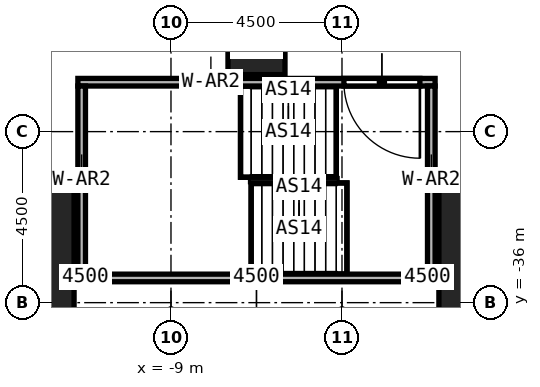
"""IFC4 building model, lengths in metres.
Left out: names, types, materials, properties, quantities, classifications, styles, units other than length and angle.
Written with IfcOpenShell. Run it as: python <this file> out.ifc"""

import sys

from ifc_helpers import new_model, si_unit, direction, frame, frame_2d, origin, origin_2d, place, context, subcontext, project, spatial, rectangle, extrude, element, fill, save


model = new_model("IFC4")
c1 = context("Model", 3, precision=1e-05, world=origin(), true_north=direction((0.0, 1.0)))
c2 = subcontext(c1, "Body", "Model", "MODEL_VIEW")
j1 = project(units=[si_unit("LENGTHUNIT", "METRE"), si_unit("PLANEANGLEUNIT", "RADIAN")], contexts=[c1])
p1 = place(None, origin())
s1 = spatial("IfcSite", under=j1, at=p1, CompositionType="ELEMENT")
p2 = place(p1, origin())
s2 = spatial("IfcBuilding", under=s1, at=p2, CompositionType="ELEMENT")
p3 = place(p2, frame((0.0, 0.0, 19.0)))
s3 = spatial("IfcBuildingStorey", under=s2, at=p3, CompositionType="ELEMENT", Elevation=19.0)
for number, where, z_axis, x_axis in (
    (1, (-13.5, -35.85, 0.0), (0.0, 0.0, 1.0), (1.0, 0.0, 0.0)),
    (2, (0.0, -35.85, 0.0), (0.0, 0.0, 1.0), (1.0, 0.0, 0.0)),
):
    element("IfcColumn", number, at=place(p3, frame(where, z_axis=z_axis, x_axis=x_axis)), inside=s3, PredefinedType="COLUMN", context=c2, shape_type="SweptSolid", body=[
        extrude(rectangle(XDim=3.9, YDim=6.3, at=origin_2d()), origin(), (0.0, 0.0, 1.0), 6.0),
    ])
p4 = place(p3, frame((-6.75, -29.25, 0.0), z_axis=(0.0, 0.0, 1.0), x_axis=(1.0, 0.0, 0.0)))
e3 = element("IfcColumn", 3, at=p4, inside=s3, PredefinedType="COLUMN", context=c2, shape_type="SweptSolid", body=[
    extrude(rectangle(XDim=1.5, YDim=1.5, at=origin_2d()), origin(), (0.0, 0.0, 1.0), 6.0),
])
p5 = place(p3, frame((-2.05, -30.2, 0.0), z_axis=(0.0, 0.0, 1.0), x_axis=(-1.0, 0.0, 0.0)))
e4 = element("IfcWall", 4, at=p5, inside=s3, PredefinedType="SOLIDWALL", context=c2, shape_type="SweptSolid", body=[
    extrude(rectangle(XDim=9.4, YDim=0.2, at=frame_2d((4.7, 0.0))), origin(), (0.0, 0.0, 1.0), 6.0),
])
p6 = place(p5, frame((0.4, 0.0, 0.0)))
e5 = element("IfcOpeningElement", 5, at=p6, cuts=e4, PredefinedType="OPENING", context=c2, shape_type="SweptSolid", body=[
    extrude(rectangle(XDim=2.0, YDim=2.4, at=frame_2d((1.0, 1.2))), frame((0.0, 0.1, 0.0), z_axis=(0.0, -1.0, 0.0), x_axis=(1.0, 0.0, 0.0)), (0.0, 0.0, 1.0), 0.2),
])
p7 = place(p3, frame((-11.45, -35.35, 0.0), z_axis=(0.0, 0.0, 1.0), x_axis=(1.0, 0.0, 0.0)))
e6 = element("IfcWall", 6, at=p7, inside=s3, PredefinedType="SOLIDWALL", context=c2, shape_type="SweptSolid", body=[
    extrude(rectangle(XDim=9.4, YDim=0.2, at=frame_2d((4.7, 0.0))), origin(), (0.0, 0.0, 1.0), 6.0),
])
for number, where, z_axis, x_axis in (
    (7, (-11.35, -35.25, 0.0), (0.0, 0.0, 1.0), (0.0, 1.0, 0.0)),
    (8, (-2.15, -35.25, 0.0), (0.0, 0.0, 1.0), (0.0, 1.0, 0.0)),
):
    element("IfcWall", number, at=place(p3, frame(where, z_axis=z_axis, x_axis=x_axis)), inside=s3, PredefinedType="SOLIDWALL", context=c2, shape_type="SweptSolid", body=[
        extrude(rectangle(XDim=4.95, YDim=0.2, at=frame_2d((2.475, 0.0))), origin(), (0.0, 0.0, 1.0), 6.0),
    ])
p8 = place(p6, origin())
e9 = element("IfcDoor", 9, at=p8, inside=s3, OperationType="DOUBLE_DOOR_SINGLE_SWING", PredefinedType="DOOR", context=c2, shape_type="SweptSolid", body=[
    extrude(rectangle(XDim=2.0, YDim=2.4, at=frame_2d((1.0, 1.2))), frame((0.0, 0.025, 0.0), z_axis=(0.0, -1.0, 0.0), x_axis=(1.0, 0.0, 0.0)), (0.0, 0.0, 1.0), 0.05),
])
fill(e5, e9)
save(model, sys.argv[1])
